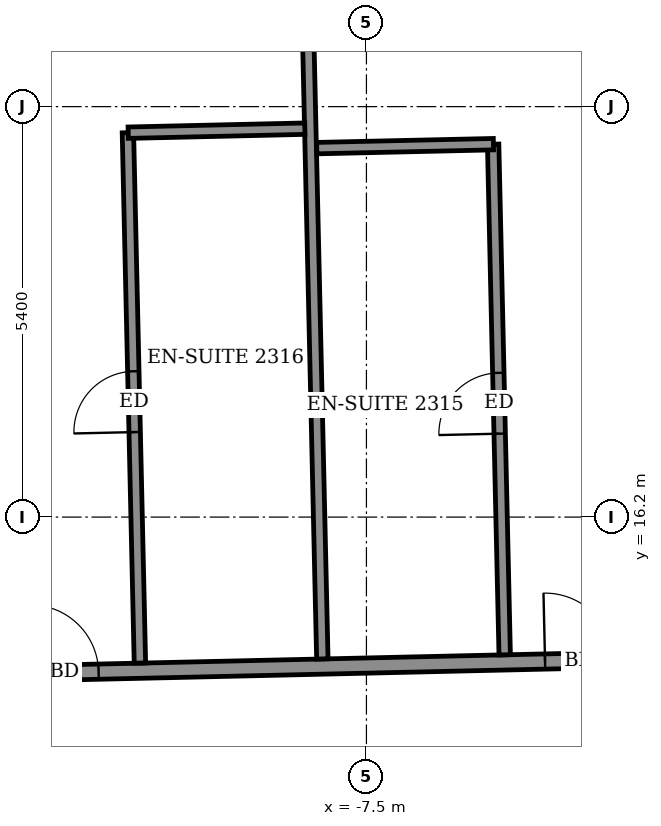
"""IFC4 building model, lengths in metres.
Left out: names, types, materials, properties, quantities, classifications, styles, units other than length and angle.
Written with IfcOpenShell. Run it as: python <this file> out.ifc"""

import sys

from ifc_helpers import new_model, si_unit, direction, frame, frame_2d, origin, place, context, subcontext, project, spatial, rectangle, extrude, element, fill, save


model = new_model("IFC4")
c1 = context("Model", 3, precision=1e-05, world=origin(), true_north=direction((0.0, 1.0)))
c2 = subcontext(c1, "Body", "Model", "MODEL_VIEW")
j1 = project(units=[si_unit("LENGTHUNIT", "METRE"), si_unit("PLANEANGLEUNIT", "RADIAN")], contexts=[c1])
p1 = place(None, origin())
s1 = spatial("IfcSite", under=j1, at=p1, CompositionType="ELEMENT")
p2 = place(p1, origin())
s2 = spatial("IfcBuilding", under=s1, at=p2, CompositionType="ELEMENT")
p3 = place(p2, frame((0.0, 0.0, 93.7)))
s3 = spatial("IfcBuildingStorey", under=s2, at=p3, CompositionType="ELEMENT", Elevation=93.7)
p4 = place(p3, frame((-24.92, 13.851, 0.0), z_axis=(0.0, 0.0, 1.0), x_axis=(0.999742411711, 0.022696039895, 0.0)))
e1 = element("IfcWall", 1, at=p4, inside=s3, PredefinedType="PARTITIONING", context=c2, shape_type="SweptSolid", body=[
    extrude(rectangle(XDim=52.472, YDim=0.2, at=frame_2d((26.236, 0.0))), origin(), (0.0, 0.0, 1.0), 3.05),
])
p5 = place(p4, frame((50.088, 0.0, 0.0)))
e2 = element("IfcOpeningElement", 2, at=p5, cuts=e1, PredefinedType="OPENING", context=c2, shape_type="SweptSolid", body=[
    extrude(rectangle(XDim=1.0, YDim=2.1, at=frame_2d((0.5, 1.05))), frame((0.0, 0.11, 0.0), z_axis=(0.0, -1.0, 0.0), x_axis=(1.0, 0.0, 0.0)), (0.0, 0.0, 1.0), 0.22),
])
p6 = place(p4, frame((45.725, 0.0, 0.0)))
e3 = element("IfcOpeningElement", 3, at=p6, cuts=e1, PredefinedType="OPENING", context=c2, shape_type="SweptSolid", body=[
    extrude(rectangle(XDim=0.9, YDim=2.1, at=frame_2d((0.45, 1.05))), frame((0.0, 0.11, 0.0), z_axis=(0.0, -1.0, 0.0), x_axis=(1.0, 0.0, 0.0)), (0.0, 0.0, 1.0), 0.22),
])
p7 = place(p4, frame((38.975, 0.0, 0.0)))
e4 = element("IfcOpeningElement", 4, at=p7, cuts=e1, PredefinedType="OPENING", context=c2, shape_type="SweptSolid", body=[
    extrude(rectangle(XDim=0.9, YDim=2.1, at=frame_2d((0.45, 1.05))), frame((0.0, 0.11, 0.0), z_axis=(0.0, -1.0, 0.0), x_axis=(1.0, 0.0, 0.0)), (0.0, 0.0, 1.0), 0.22),
])
p8 = place(p4, frame((37.05, 0.0, 0.0)))
e5 = element("IfcOpeningElement", 5, at=p8, cuts=e1, PredefinedType="OPENING", context=c2, shape_type="SweptSolid", body=[
    extrude(rectangle(XDim=0.9, YDim=2.1, at=frame_2d((0.45, 1.05))), frame((0.0, 0.11, 0.0), z_axis=(0.0, -1.0, 0.0), x_axis=(1.0, 0.0, 0.0)), (0.0, 0.0, 1.0), 0.22),
])
p9 = place(p4, frame((30.35, 0.0, 0.0)))
e6 = element("IfcOpeningElement", 6, at=p9, cuts=e1, PredefinedType="OPENING", context=c2, shape_type="SweptSolid", body=[
    extrude(rectangle(XDim=0.9, YDim=2.1, at=frame_2d((0.45, 1.05))), frame((0.0, 0.11, 0.0), z_axis=(0.0, -1.0, 0.0), x_axis=(1.0, 0.0, 0.0)), (0.0, 0.0, 1.0), 0.22),
])
p10 = place(p4, frame((28.4, 0.0, 0.0)))
e7 = element("IfcOpeningElement", 7, at=p10, cuts=e1, PredefinedType="OPENING", context=c2, shape_type="SweptSolid", body=[
    extrude(rectangle(XDim=0.9, YDim=2.1, at=frame_2d((0.45, 1.05))), frame((0.0, 0.11, 0.0), z_axis=(0.0, -1.0, 0.0), x_axis=(1.0, 0.0, 0.0)), (0.0, 0.0, 1.0), 0.22),
])
p11 = place(p4, frame((21.675, 0.0, 0.0)))
e8 = element("IfcOpeningElement", 8, at=p11, cuts=e1, PredefinedType="OPENING", context=c2, shape_type="SweptSolid", body=[
    extrude(rectangle(XDim=0.9, YDim=2.1, at=frame_2d((0.45, 1.05))), frame((0.0, 0.11, 0.0), z_axis=(0.0, -1.0, 0.0), x_axis=(1.0, 0.0, 0.0)), (0.0, 0.0, 1.0), 0.22),
])
p12 = place(p4, frame((19.775, 0.0, 0.0)))
e9 = element("IfcOpeningElement", 9, at=p12, cuts=e1, PredefinedType="OPENING", context=c2, shape_type="SweptSolid", body=[
    extrude(rectangle(XDim=0.9, YDim=2.1, at=frame_2d((0.45, 1.05))), frame((0.0, 0.11, 0.0), z_axis=(0.0, -1.0, 0.0), x_axis=(1.0, 0.0, 0.0)), (0.0, 0.0, 1.0), 0.22),
])
p13 = place(p4, frame((13.0, 0.0, 0.0)))
e10 = element("IfcOpeningElement", 10, at=p13, cuts=e1, PredefinedType="OPENING", context=c2, shape_type="SweptSolid", body=[
    extrude(rectangle(XDim=0.9, YDim=2.1, at=frame_2d((0.45, 1.05))), frame((0.0, 0.11, 0.0), z_axis=(0.0, -1.0, 0.0), x_axis=(1.0, 0.0, 0.0)), (0.0, 0.0, 1.0), 0.22),
])
p14 = place(p4, frame((11.075, 0.0, 0.0)))
e11 = element("IfcOpeningElement", 11, at=p14, cuts=e1, PredefinedType="OPENING", context=c2, shape_type="SweptSolid", body=[
    extrude(rectangle(XDim=0.9, YDim=2.1, at=frame_2d((0.45, 1.05))), frame((0.0, 0.11, 0.0), z_axis=(0.0, -1.0, 0.0), x_axis=(1.0, 0.0, 0.0)), (0.0, 0.0, 1.0), 0.22),
])
p15 = place(p4, frame((3.049, 0.0, 0.0)))
e12 = element("IfcOpeningElement", 12, at=p15, cuts=e1, PredefinedType="OPENING", context=c2, shape_type="SweptSolid", body=[
    extrude(rectangle(XDim=1.0, YDim=2.1, at=frame_2d((0.5, 1.05))), frame((0.0, 0.11, 0.0), z_axis=(0.0, -1.0, 0.0), x_axis=(1.0, 0.0, 0.0)), (0.0, 0.0, 1.0), 0.22),
])
p16 = place(p3, frame((-10.48, 14.279, 0.0), z_axis=(0.0, 0.0, 1.0), x_axis=(-0.022630826984, 0.999743890039, 0.0)))
e13 = element("IfcWall", 13, at=p16, inside=s3, PredefinedType="PARTITIONING", context=c2, shape_type="SweptSolid", body=[
    extrude(rectangle(XDim=6.98, YDim=0.15, at=frame_2d((3.49, 0.0))), origin(), (0.0, 0.0, 1.0), 3.05),
])
p17 = place(p16, frame((3.04, 0.0, 0.0)))
e14 = element("IfcOpeningElement", 14, at=p17, cuts=e13, PredefinedType="OPENING", context=c2, shape_type="SweptSolid", body=[
    extrude(rectangle(XDim=0.8, YDim=2.1, at=frame_2d((0.4, 1.05))), frame((0.0, 0.085, 0.0), z_axis=(0.0, -1.0, 0.0), x_axis=(1.0, 0.0, 0.0)), (0.0, 0.0, 1.0), 0.17),
])
p18 = place(p3, frame((-8.08, 14.334, 0.0), z_axis=(0.0, 0.0, 1.0), x_axis=(-0.022741979748, 0.999741367733, 0.0)))
e15 = element("IfcWall", 15, at=p18, inside=s3, PredefinedType="PARTITIONING", context=c2, shape_type="SweptSolid", body=[
    extrude(rectangle(XDim=12.399, YDim=0.15, at=frame_2d((6.2, 0.0))), origin(), (0.0, 0.0, 1.0), 3.05),
])
p19 = place(p3, frame((-5.681, 14.388, 0.0), z_axis=(0.0, 0.0, 1.0), x_axis=(-0.022634748998, 0.99974380125, 0.0)))
e16 = element("IfcWall", 16, at=p19, inside=s3, PredefinedType="PARTITIONING", context=c2, shape_type="SweptSolid", body=[
    extrude(rectangle(XDim=6.72, YDim=0.15, at=frame_2d((3.36, 0.0))), origin(), (0.0, 0.0, 1.0), 3.05),
])
p20 = place(p19, frame((2.91, 0.0, 0.0)))
e17 = element("IfcOpeningElement", 17, at=p20, cuts=e16, PredefinedType="OPENING", context=c2, shape_type="SweptSolid", body=[
    extrude(rectangle(XDim=0.8, YDim=2.1, at=frame_2d((0.4, 1.05))), frame((0.0, 0.085, 0.0), z_axis=(0.0, -1.0, 0.0), x_axis=(1.0, 0.0, 0.0)), (0.0, 0.0, 1.0), 0.17),
])
p21 = place(p3, frame((-8.154, 21.054, 0.0), z_axis=(0.0, 0.0, 1.0), x_axis=(0.999749954681, 0.022361308448, 0.0)))
e18 = element("IfcWall", 18, at=p21, inside=s3, PredefinedType="PARTITIONING", context=c2, shape_type="SweptSolid", body=[
    extrude(rectangle(XDim=2.325, YDim=0.15, at=frame_2d((1.163, 0.0))), origin(), (0.0, 0.0, 1.0), 3.05),
])
p22 = place(p3, frame((-10.634, 21.257, 0.0), z_axis=(0.0, 0.0, 1.0), x_axis=(0.999740260747, 0.02279059109, 0.0)))
e19 = element("IfcWall", 19, at=p22, inside=s3, PredefinedType="PARTITIONING", context=c2, shape_type="SweptSolid", body=[
    extrude(rectangle(XDim=2.324, YDim=0.15, at=frame_2d((1.162, 0.0))), origin(), (0.0, 0.0, 1.0), 3.05),
])
p23 = place(p12, origin())
e20 = element("IfcDoor", 20, at=p23, inside=s3, OperationType="SINGLE_SWING_LEFT", PredefinedType="DOOR", context=c2, shape_type="SweptSolid", body=[
    extrude(rectangle(XDim=0.9, YDim=2.1, at=frame_2d((0.45, 1.05))), frame((0.0, 0.025, 0.0), z_axis=(0.0, -1.0, 0.0), x_axis=(1.0, 0.0, 0.0)), (0.0, 0.0, 1.0), 0.05),
])
fill(e9, e20)
p24 = place(p20, origin())
e21 = element("IfcDoor", 21, at=p24, inside=s3, OperationType="SINGLE_SWING_LEFT", PredefinedType="DOOR", context=c2, shape_type="SweptSolid", body=[
    extrude(rectangle(XDim=0.8, YDim=2.1, at=frame_2d((0.4, 1.05))), frame((0.0, 0.025, 0.0), z_axis=(0.0, -1.0, 0.0), x_axis=(1.0, 0.0, 0.0)), (0.0, 0.0, 1.0), 0.05),
])
fill(e17, e21)
p25 = place(p13, origin())
e22 = element("IfcDoor", 22, at=p25, inside=s3, OperationType="SINGLE_SWING_RIGHT", PredefinedType="DOOR", context=c2, shape_type="SweptSolid", body=[
    extrude(rectangle(XDim=0.9, YDim=2.1, at=frame_2d((0.45, 1.05))), frame((0.0, 0.025, 0.0), z_axis=(0.0, -1.0, 0.0), x_axis=(1.0, 0.0, 0.0)), (0.0, 0.0, 1.0), 0.05),
])
fill(e10, e22)
p26 = place(p17, origin())
e23 = element("IfcDoor", 23, at=p26, inside=s3, OperationType="SINGLE_SWING_RIGHT", PredefinedType="DOOR", context=c2, shape_type="SweptSolid", body=[
    extrude(rectangle(XDim=0.8, YDim=2.1, at=frame_2d((0.4, 1.05))), frame((0.0, 0.025, 0.0), z_axis=(0.0, -1.0, 0.0), x_axis=(1.0, 0.0, 0.0)), (0.0, 0.0, 1.0), 0.05),
])
fill(e14, e23)
save(model, sys.argv[1])
